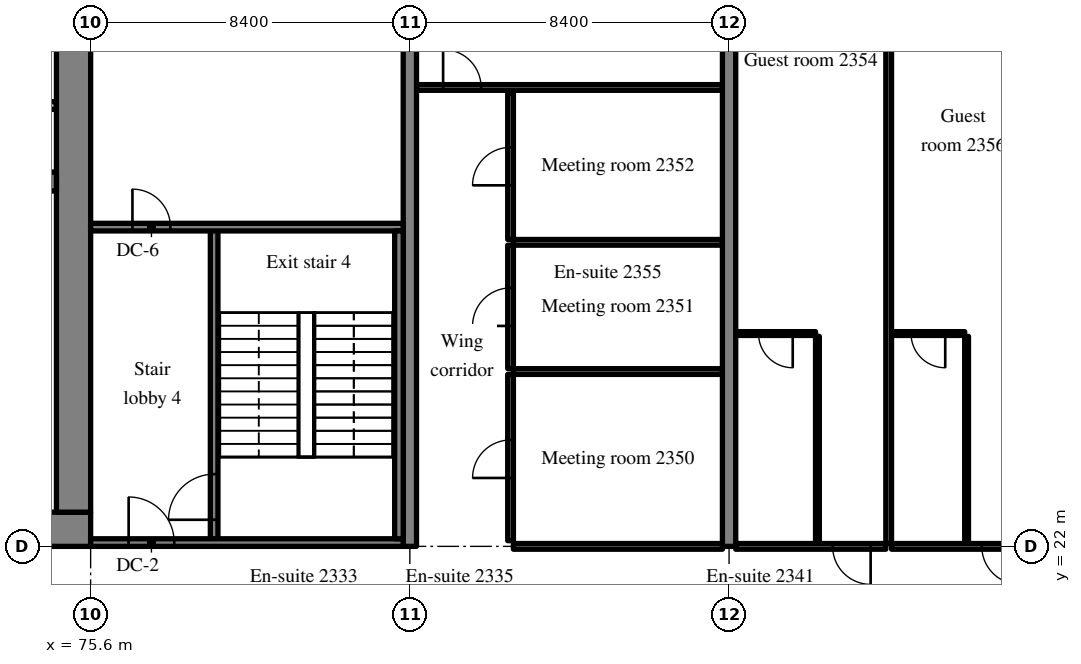
"""IFC4 building model, lengths in metres.
Left out: names, types, materials, properties, quantities, classifications, styles, units other than length and angle.
Written with IfcOpenShell. Run it as: python <this file> out.ifc"""

import sys

from ifc_helpers import new_model, si_unit, direction, frame, frame_2d, origin, place, context, subcontext, project, spatial, rectangle, extrude, source, transform, mapped, element, fill, save


model = new_model("IFC4")
c1 = context("Model", 3, precision=1e-05, world=origin(), true_north=direction((0.0, 1.0)))
c2 = subcontext(c1, "Body", "Model", "MODEL_VIEW")
j1 = project(units=[si_unit("LENGTHUNIT", "METRE"), si_unit("PLANEANGLEUNIT", "RADIAN")], contexts=[c1])
p1 = place(None, origin())
s1 = spatial("IfcSite", under=j1, at=p1, CompositionType="ELEMENT")
p2 = place(p1, origin())
s2 = spatial("IfcBuilding", under=s1, at=p2, CompositionType="ELEMENT")
p3 = place(p2, frame((0.0, 0.0, 99.0)))
s3 = spatial("IfcBuildingStorey", under=s2, at=p3, CompositionType="ELEMENT", Elevation=99.0)
m1 = source(origin(), c2, "Body", "SweptSolid", [
    extrude(rectangle(XDim=50.4, YDim=0.9, at=frame_2d((25.2, 0.0))), origin(), (0.0, 0.0, 1.0), 3.52),
])
p4 = place(p3, frame((25.2, 22.45, 0.0), z_axis=(0.0, 0.0, 1.0), x_axis=(1.0, 0.0, 0.0)))
e1 = element("IfcWall", 1, at=p4, inside=s3, PredefinedType="SHEAR", context=c2, shape_type="MappedRepresentation", body=[
    mapped(m1, transform((0.0, 0.0, 0.0), scale=1.0)),
])
m2 = source(origin(), c2, "Body", "SweptSolid", [
    extrude(rectangle(XDim=1.8, YDim=2.1, at=frame_2d((0.9, 1.05))), frame((0.0, 0.46, 0.0), z_axis=(0.0, -1.0, 0.0), x_axis=(1.0, 0.0, 0.0)), (0.0, 0.0, 1.0), 0.92),
])
p5 = place(p4, frame((15.9, 0.0, 0.0)))
e2 = element("IfcOpeningElement", 2, at=p5, cuts=e1, PredefinedType="OPENING", context=c2, shape_type="MappedRepresentation", body=[
    mapped(m2, transform((0.0, 0.0, 0.0), scale=1.0)),
])
m3 = source(origin(), c2, "Body", "SweptSolid", [
    extrude(rectangle(XDim=1.2, YDim=2.1, at=frame_2d((0.6, 1.05))), frame((0.0, 0.46, 0.0), z_axis=(0.0, -1.0, 0.0), x_axis=(1.0, 0.0, 0.0)), (0.0, 0.0, 1.0), 0.92),
])
p6 = place(p4, frame((26.975, 0.0, 0.0)))
e3 = element("IfcOpeningElement", 3, at=p6, cuts=e1, PredefinedType="OPENING", context=c2, shape_type="MappedRepresentation", body=[
    mapped(m3, transform((0.0, 0.0, 0.0), scale=1.0)),
])
m4 = source(origin(), c2, "Body", "SweptSolid", [
    extrude(rectangle(XDim=0.9, YDim=2.1, at=frame_2d((0.45, 1.05))), frame((0.0, 0.46, 0.0), z_axis=(0.0, -1.0, 0.0), x_axis=(1.0, 0.0, 0.0)), (0.0, 0.0, 1.0), 0.92),
])
p7 = place(p4, frame((32.25, 0.0, 0.0)))
e4 = element("IfcOpeningElement", 4, at=p7, cuts=e1, PredefinedType="OPENING", context=c2, shape_type="MappedRepresentation", body=[
    mapped(m4, transform((0.0, 0.0, 0.0), scale=1.0)),
])
p8 = place(p4, frame((38.275, 0.0, 0.0)))
e5 = element("IfcOpeningElement", 5, at=p8, cuts=e1, PredefinedType="OPENING", context=c2, shape_type="MappedRepresentation", body=[
    mapped(m4, transform((0.0, 0.0, 0.0), scale=1.0)),
])
p9 = place(p4, frame((6.45, 0.0, 0.0)))
e6 = element("IfcOpeningElement", 6, at=p9, cuts=e1, PredefinedType="OPENING", context=c2, shape_type="MappedRepresentation", body=[
    mapped(m3, transform((0.0, 0.0, 0.0), scale=1.0)),
])
p10 = place(p4, frame((47.775, 0.0, 0.0)))
e7 = element("IfcOpeningElement", 7, at=p10, cuts=e1, PredefinedType="OPENING", context=c2, shape_type="MappedRepresentation", body=[
    mapped(m3, transform((0.0, 0.0, 0.0), scale=1.0)),
])
m5 = source(origin(), c2, "Body", "SweptSolid", [
    extrude(rectangle(XDim=18.2, YDim=0.9, at=frame_2d((9.1, 0.0))), origin(), (0.0, 0.0, 1.0), 3.52),
])
p11 = place(p3, frame((75.15, 22.9, 0.0), z_axis=(0.0, 0.0, 1.0), x_axis=(0.0, 1.0, 0.0)))
e8 = element("IfcWall", 8, at=p11, inside=s3, PredefinedType="SHEAR", context=c2, shape_type="MappedRepresentation", body=[
    mapped(m5, transform((0.0, 0.0, 0.0), scale=1.0)),
])
p12 = place(p11, frame((12.5, 0.0, 0.0)))
e9 = element("IfcOpeningElement", 9, at=p12, cuts=e8, PredefinedType="OPENING", context=c2, shape_type="MappedRepresentation", body=[
    mapped(m3, transform((0.0, 0.0, 0.0), scale=1.0)),
])
m6 = source(origin(), c2, "Body", "SweptSolid", [
    extrude(rectangle(XDim=7.25, YDim=0.5, at=frame_2d((3.625, 0.0))), origin(), (0.0, 0.0, 1.0), 3.52),
])
p13 = place(p3, frame((67.45, 31.6, 0.0), z_axis=(0.0, 0.0, 1.0), x_axis=(1.0, 0.0, 0.0)))
e10 = element("IfcWall", 10, at=p13, inside=s3, PredefinedType="SHEAR", context=c2, shape_type="MappedRepresentation", body=[
    mapped(m6, transform((0.0, 0.0, 0.0), scale=1.0)),
])
m7 = source(origin(), c2, "Body", "SweptSolid", [
    extrude(rectangle(XDim=1.1, YDim=2.1, at=frame_2d((0.55, 1.05))), frame((0.0, 0.26, 0.0), z_axis=(0.0, -1.0, 0.0), x_axis=(1.0, 0.0, 0.0)), (0.0, 0.0, 1.0), 0.52),
])
p14 = place(p13, frame((5.575, 0.0, 0.0)))
e11 = element("IfcOpeningElement", 11, at=p14, cuts=e10, PredefinedType="OPENING", context=c2, shape_type="MappedRepresentation", body=[
    mapped(m7, transform((0.0, 0.0, 0.0), scale=1.0)),
])
m8 = source(origin(), c2, "Body", "SweptSolid", [
    extrude(rectangle(XDim=20.0, YDim=0.35, at=frame_2d((10.0, 0.0))), origin(), (0.0, 0.0, 1.0), 3.52),
])
for number, where, z_axis, x_axis in (
    (12, (84.0, 22.0, 0.0), (0.0, 0.0, 1.0), (0.0, 1.0, 0.0)),
    (13, (92.4, 22.0, 0.0), (0.0, 0.0, 1.0), (0.0, 1.0, 0.0)),
):
    element("IfcWall", number, at=place(p3, frame(where, z_axis=z_axis, x_axis=x_axis)), inside=s3, PredefinedType="SHEAR", context=c2, shape_type="MappedRepresentation", body=[
        mapped(m8, transform((0.0, 0.0, 0.0), scale=1.0)),
    ])
m9 = source(origin(), c2, "Body", "SweptSolid", [
    extrude(rectangle(XDim=2.25, YDim=0.2, at=frame_2d((1.125, 0.0))), origin(), (0.0, 0.0, 1.0), 3.52),
])
p15 = place(p3, frame((72.45, 33.6, 0.0), z_axis=(0.0, 0.0, 1.0), x_axis=(1.0, 0.0, 0.0)))
e14 = element("IfcWall", 14, at=p15, inside=s3, PredefinedType="SOLIDWALL", context=c2, shape_type="MappedRepresentation", body=[
    mapped(m9, transform((0.0, 0.0, 0.0), scale=1.0)),
])
m10 = source(origin(), c2, "Body", "SweptSolid", [
    extrude(rectangle(XDim=8.3, YDim=0.2, at=frame_2d((4.15, 0.0))), origin(), (0.0, 0.0, 1.0), 3.52),
])
p16 = place(p3, frame((78.85, 22.1, 0.0), z_axis=(0.0, 0.0, 1.0), x_axis=(0.0, 1.0, 0.0)))
e15 = element("IfcWall", 15, at=p16, inside=s3, PredefinedType="SOLIDWALL", context=c2, shape_type="MappedRepresentation", body=[
    mapped(m10, transform((0.0, 0.0, 0.0), scale=1.0)),
])
m11 = source(origin(), c2, "Body", "SweptSolid", [
    extrude(rectangle(XDim=1.2, YDim=2.1, at=frame_2d((0.6, 1.05))), frame((0.0, 0.11, 0.0), z_axis=(0.0, -1.0, 0.0), x_axis=(1.0, 0.0, 0.0)), (0.0, 0.0, 1.0), 0.22),
])
p17 = place(p16, frame((0.6, 0.0, 0.0)))
e16 = element("IfcOpeningElement", 16, at=p17, cuts=e15, PredefinedType="OPENING", context=c2, shape_type="MappedRepresentation", body=[
    mapped(m11, transform((0.0, 0.0, 0.0), scale=1.0)),
])
m12 = source(origin(), c2, "Body", "SweptSolid", [
    extrude(rectangle(XDim=8.225, YDim=0.2, at=frame_2d((4.112, 0.0))), origin(), (0.0, 0.0, 1.0), 3.52),
])
p18 = place(p3, frame((83.825, 22.1, 0.0), z_axis=(0.0, 0.0, 1.0), x_axis=(-1.0, 0.0, 0.0)))
e17 = element("IfcWall", 17, at=p18, inside=s3, PredefinedType="SOLIDWALL", context=c2, shape_type="MappedRepresentation", body=[
    mapped(m12, transform((0.0, 0.0, 0.0), scale=1.0)),
])
p19 = place(p18, frame((6.025, 0.0, 0.0)))
e18 = element("IfcOpeningElement", 18, at=p19, cuts=e17, PredefinedType="OPENING", context=c2, shape_type="MappedRepresentation", body=[
    mapped(m11, transform((0.0, 0.0, 0.0), scale=1.0)),
])
p20 = place(p3, frame((83.825, 30.4, 0.0), z_axis=(0.0, 0.0, 1.0), x_axis=(-1.0, 0.0, 0.0)))
e19 = element("IfcWall", 19, at=p20, inside=s3, PredefinedType="SOLIDWALL", context=c2, shape_type="MappedRepresentation", body=[
    mapped(m12, transform((0.0, 0.0, 0.0), scale=1.0)),
])
m13 = source(origin(), c2, "Body", "SweptSolid", [
    extrude(rectangle(XDim=1.0, YDim=2.1, at=frame_2d((0.5, 1.05))), frame((0.0, 0.11, 0.0), z_axis=(0.0, -1.0, 0.0), x_axis=(1.0, 0.0, 0.0)), (0.0, 0.0, 1.0), 0.22),
])
p21 = place(p20, frame((6.125, 0.0, 0.0)))
e20 = element("IfcOpeningElement", 20, at=p21, cuts=e19, PredefinedType="OPENING", context=c2, shape_type="MappedRepresentation", body=[
    mapped(m13, transform((0.0, 0.0, 0.0), scale=1.0)),
])
m14 = source(origin(), c2, "Body", "SweptSolid", [
    extrude(rectangle(XDim=8.1, YDim=0.225, at=frame_2d((4.05, 0.0))), origin(), (0.0, 0.0, 1.0), 3.52),
])
p22 = place(p3, frame((83.713, 22.2, 0.0), z_axis=(0.0, 0.0, 1.0), x_axis=(0.0, 1.0, 0.0)))
e21 = element("IfcWall", 21, at=p22, inside=s3, PredefinedType="SOLIDWALL", context=c2, shape_type="MappedRepresentation", body=[
    mapped(m14, transform((0.0, 0.0, 0.0), scale=1.0)),
])
m15 = source(origin(), c2, "Body", "SweptSolid", [
    extrude(rectangle(XDim=5.5, YDim=0.15, at=frame_2d((2.75, 0.0))), origin(), (0.0, 0.0, 1.0), 2.82),
])
p23 = place(p3, frame((86.725, 22.0, 0.0), z_axis=(0.0, 0.0, 1.0), x_axis=(1.0, 0.0, 0.0)))
e22 = element("IfcWall", 22, at=p23, inside=s3, PredefinedType="PARTITIONING", context=c2, shape_type="MappedRepresentation", body=[
    mapped(m15, transform((0.0, 0.0, 0.0), scale=1.0)),
])
m16 = source(origin(), c2, "Body", "SweptSolid", [
    extrude(rectangle(XDim=4.375, YDim=0.15, at=frame_2d((2.188, 0.0))), origin(), (0.0, 0.0, 1.0), 3.52),
])
p24 = place(p3, frame((86.65, 22.15, 0.0), z_axis=(0.0, 0.0, 1.0), x_axis=(0.0, 1.0, 0.0)))
e23 = element("IfcWall", 23, at=p24, inside=s3, PredefinedType="PARTITIONING", context=c2, shape_type="MappedRepresentation", body=[
    mapped(m16, transform((0.0, 0.0, 0.0), scale=1.0)),
])
m17 = source(origin(), c2, "Body", "SweptSolid", [
    extrude(rectangle(XDim=1.0, YDim=2.1, at=frame_2d((0.5, 1.05))), frame((0.0, 0.085, 0.0), z_axis=(0.0, -1.0, 0.0), x_axis=(1.0, 0.0, 0.0)), (0.0, 0.0, 1.0), 0.17),
])
p25 = place(p24, frame((1.65, 0.0, 0.0)))
e24 = element("IfcOpeningElement", 24, at=p25, cuts=e23, PredefinedType="OPENING", context=c2, shape_type="MappedRepresentation", body=[
    mapped(m17, transform((0.0, 0.0, 0.0), scale=1.0)),
])
m18 = source(origin(), c2, "Body", "SweptSolid", [
    extrude(rectangle(XDim=5.5, YDim=0.15, at=frame_2d((2.75, 0.0))), origin(), (0.0, 0.0, 1.0), 3.52),
])
p26 = place(p3, frame((86.725, 26.6, 0.0), z_axis=(0.0, 0.0, 1.0), x_axis=(1.0, 0.0, 0.0)))
e25 = element("IfcWall", 25, at=p26, inside=s3, PredefinedType="PARTITIONING", context=c2, shape_type="MappedRepresentation", body=[
    mapped(m18, transform((0.0, 0.0, 0.0), scale=1.0)),
])
m19 = source(origin(), c2, "Body", "SweptSolid", [
    extrude(rectangle(XDim=3.25, YDim=0.15, at=frame_2d((1.625, 0.0))), origin(), (0.0, 0.0, 1.0), 3.52),
])
p27 = place(p3, frame((86.65, 26.675, 0.0), z_axis=(0.0, 0.0, 1.0), x_axis=(0.0, 1.0, 0.0)))
e26 = element("IfcWall", 26, at=p27, inside=s3, PredefinedType="PARTITIONING", context=c2, shape_type="MappedRepresentation", body=[
    mapped(m19, transform((0.0, 0.0, 0.0), scale=1.0)),
])
p28 = place(p27, frame((1.125, 0.0, 0.0)))
e27 = element("IfcOpeningElement", 27, at=p28, cuts=e26, PredefinedType="OPENING", context=c2, shape_type="MappedRepresentation", body=[
    mapped(m17, transform((0.0, 0.0, 0.0), scale=1.0)),
])
p29 = place(p3, frame((86.725, 30.0, 0.0), z_axis=(0.0, 0.0, 1.0), x_axis=(1.0, 0.0, 0.0)))
e28 = element("IfcWall", 28, at=p29, inside=s3, PredefinedType="PARTITIONING", context=c2, shape_type="MappedRepresentation", body=[
    mapped(m18, transform((0.0, 0.0, 0.0), scale=1.0)),
])
m20 = source(origin(), c2, "Body", "SweptSolid", [
    extrude(rectangle(XDim=3.85, YDim=0.15, at=frame_2d((1.925, 0.0))), origin(), (0.0, 0.0, 1.0), 3.52),
])
p30 = place(p3, frame((86.65, 30.075, 0.0), z_axis=(0.0, 0.0, 1.0), x_axis=(0.0, 1.0, 0.0)))
e29 = element("IfcWall", 29, at=p30, inside=s3, PredefinedType="PARTITIONING", context=c2, shape_type="MappedRepresentation", body=[
    mapped(m20, transform((0.0, 0.0, 0.0), scale=1.0)),
])
p31 = place(p30, frame((1.425, 0.0, 0.0)))
e30 = element("IfcOpeningElement", 30, at=p31, cuts=e29, PredefinedType="OPENING", context=c2, shape_type="MappedRepresentation", body=[
    mapped(m17, transform((0.0, 0.0, 0.0), scale=1.0)),
])
m21 = source(origin(), c2, "Body", "SweptSolid", [
    extrude(rectangle(XDim=8.05, YDim=0.15, at=frame_2d((4.025, 0.0))), origin(), (0.0, 0.0, 1.0), 3.52),
])
p32 = place(p3, frame((84.175, 34.075, 0.0), z_axis=(0.0, 0.0, 1.0), x_axis=(1.0, 0.0, 0.0)))
e31 = element("IfcWall", 31, at=p32, inside=s3, PredefinedType="PARTITIONING", context=c2, shape_type="MappedRepresentation", body=[
    mapped(m21, transform((0.0, 0.0, 0.0), scale=1.0)),
])
p33 = place(p32, frame((0.7, 0.0, 0.0)))
e32 = element("IfcOpeningElement", 32, at=p33, cuts=e31, PredefinedType="OPENING", context=c2, shape_type="MappedRepresentation", body=[
    mapped(m17, transform((0.0, 0.0, 0.0), scale=1.0)),
])
m22 = source(origin(), c2, "Body", "SweptSolid", [
    extrude(rectangle(XDim=5.45, YDim=0.1, at=frame_2d((2.725, 0.0))), origin(), (0.0, 0.0, 1.0), 3.52),
])
p34 = place(p3, frame((94.725, 22.075, 0.0), z_axis=(0.0, 0.0, 1.0), x_axis=(0.0, 1.0, 0.0)))
e33 = element("IfcWall", 33, at=p34, inside=s3, PredefinedType="PARTITIONING", context=c2, shape_type="MappedRepresentation", body=[
    mapped(m22, transform((0.0, 0.0, 0.0), scale=1.0)),
])
m23 = source(origin(), c2, "Body", "SweptSolid", [
    extrude(rectangle(XDim=2.1, YDim=0.1, at=frame_2d((1.05, 0.0))), origin(), (0.0, 0.0, 1.0), 3.52),
])
p35 = place(p3, frame((92.575, 27.6, 0.0), z_axis=(0.0, 0.0, 1.0), x_axis=(1.0, 0.0, 0.0)))
e34 = element("IfcWall", 34, at=p35, inside=s3, PredefinedType="PARTITIONING", context=c2, shape_type="MappedRepresentation", body=[
    mapped(m23, transform((0.0, 0.0, 0.0), scale=1.0)),
])
m24 = source(origin(), c2, "Body", "SweptSolid", [
    extrude(rectangle(XDim=0.9, YDim=2.1, at=frame_2d((0.45, 1.05))), frame((0.0, 0.06, 0.0), z_axis=(0.0, -1.0, 0.0), x_axis=(1.0, 0.0, 0.0)), (0.0, 0.0, 1.0), 0.12),
])
p36 = place(p35, frame((0.6, 0.0, 0.0)))
e35 = element("IfcOpeningElement", 35, at=p36, cuts=e34, PredefinedType="OPENING", context=c2, shape_type="MappedRepresentation", body=[
    mapped(m24, transform((0.0, 0.0, 0.0), scale=1.0)),
])
m25 = source(origin(), c2, "Body", "SweptSolid", [
    extrude(rectangle(XDim=3.95, YDim=0.15, at=frame_2d((1.975, 0.0))), origin(), (0.0, 0.0, 1.0), 2.82),
])
p37 = place(p3, frame((92.575, 22.0, 0.0), z_axis=(0.0, 0.0, 1.0), x_axis=(1.0, 0.0, 0.0)))
e36 = element("IfcWall", 36, at=p37, inside=s3, PredefinedType="PARTITIONING", context=c2, shape_type="MappedRepresentation", body=[
    mapped(m25, transform((0.0, 0.0, 0.0), scale=1.0)),
])
p38 = place(p37, frame((2.55, 0.0, 0.0)))
e37 = element("IfcOpeningElement", 37, at=p38, cuts=e36, PredefinedType="OPENING", context=c2, shape_type="MappedRepresentation", body=[
    mapped(m17, transform((0.0, 0.0, 0.0), scale=1.0)),
])
p39 = place(p3, frame((98.65, 22.075, 0.0), z_axis=(0.0, 0.0, 1.0), x_axis=(0.0, 1.0, 0.0)))
e38 = element("IfcWall", 38, at=p39, inside=s3, PredefinedType="PARTITIONING", context=c2, shape_type="MappedRepresentation", body=[
    mapped(m22, transform((0.0, 0.0, 0.0), scale=1.0)),
])
m26 = source(origin(), c2, "Body", "SweptSolid", [
    extrude(rectangle(XDim=1.925, YDim=0.1, at=frame_2d((0.962, 0.0))), origin(), (0.0, 0.0, 1.0), 3.52),
])
p40 = place(p3, frame((96.675, 27.6, 0.0), z_axis=(0.0, 0.0, 1.0), x_axis=(1.0, 0.0, 0.0)))
e39 = element("IfcWall", 39, at=p40, inside=s3, PredefinedType="PARTITIONING", context=c2, shape_type="MappedRepresentation", body=[
    mapped(m26, transform((0.0, 0.0, 0.0), scale=1.0)),
])
p41 = place(p40, frame((0.513, 0.0, 0.0)))
e40 = element("IfcOpeningElement", 40, at=p41, cuts=e39, PredefinedType="OPENING", context=c2, shape_type="MappedRepresentation", body=[
    mapped(m24, transform((0.0, 0.0, 0.0), scale=1.0)),
])
m27 = source(origin(), c2, "Body", "SweptSolid", [
    extrude(rectangle(XDim=3.775, YDim=0.15, at=frame_2d((1.887, 0.0))), origin(), (0.0, 0.0, 1.0), 2.82),
])
p42 = place(p3, frame((96.675, 22.0, 0.0), z_axis=(0.0, 0.0, 1.0), x_axis=(1.0, 0.0, 0.0)))
e41 = element("IfcWall", 41, at=p42, inside=s3, PredefinedType="PARTITIONING", context=c2, shape_type="MappedRepresentation", body=[
    mapped(m27, transform((0.0, 0.0, 0.0), scale=1.0)),
])
p43 = place(p42, frame((2.375, 0.0, 0.0)))
e42 = element("IfcOpeningElement", 42, at=p43, cuts=e41, PredefinedType="OPENING", context=c2, shape_type="MappedRepresentation", body=[
    mapped(m17, transform((0.0, 0.0, 0.0), scale=1.0)),
])
m28 = source(origin(), c2, "Body", "SweptSolid", [
    extrude(rectangle(XDim=19.347, YDim=0.15, at=frame_2d((9.674, 0.0))), origin(), (0.0, 0.0, 1.0), 3.52),
])
p44 = place(p3, frame((96.6, 22.075, 0.0), z_axis=(0.0, 0.0, 1.0), x_axis=(0.0, 1.0, 0.0)))
e43 = element("IfcWall", 43, at=p44, inside=s3, PredefinedType="PARTITIONING", context=c2, shape_type="MappedRepresentation", body=[
    mapped(m28, transform((0.0, 0.0, 0.0), scale=1.0)),
])
m29 = source(origin(), c2, "Body", "SweptSolid", [
    extrude(rectangle(XDim=1.2, YDim=2.1, at=frame_2d((0.6, 1.05))), frame((0.0, 0.025, 0.0), z_axis=(0.0, -1.0, 0.0), x_axis=(1.0, 0.0, 0.0)), (0.0, 0.0, 1.0), 0.05),
])
p45 = place(p17, origin())
e44 = element("IfcDoor", 44, at=p45, inside=s3, OperationType="SINGLE_SWING_LEFT", PredefinedType="DOOR", context=c2, shape_type="MappedRepresentation", body=[
    mapped(m29, transform((0.0, 0.0, 0.0), scale=1.0)),
])
fill(e16, e44)
p46 = place(p19, origin())
e45 = element("IfcDoor", 45, at=p46, inside=s3, OperationType="SINGLE_SWING_RIGHT", PredefinedType="DOOR", context=c2, shape_type="MappedRepresentation", body=[
    mapped(m29, transform((0.0, 0.0, 0.0), scale=1.0)),
])
fill(e18, e45)
m30 = source(origin(), c2, "Body", "SweptSolid", [
    extrude(rectangle(XDim=1.0, YDim=2.1, at=frame_2d((0.5, 1.05))), frame((0.0, 0.025, 0.0), z_axis=(0.0, -1.0, 0.0), x_axis=(1.0, 0.0, 0.0)), (0.0, 0.0, 1.0), 0.05),
])
p47 = place(p21, origin())
e46 = element("IfcDoor", 46, at=p47, inside=s3, OperationType="SINGLE_SWING_RIGHT", PredefinedType="DOOR", context=c2, shape_type="MappedRepresentation", body=[
    mapped(m30, transform((0.0, 0.0, 0.0), scale=1.0)),
])
fill(e20, e46)
p48 = place(p25, origin())
e47 = element("IfcDoor", 47, at=p48, inside=s3, OperationType="SINGLE_SWING_LEFT", PredefinedType="DOOR", context=c2, shape_type="MappedRepresentation", body=[
    mapped(m30, transform((0.0, 0.0, 0.0), scale=1.0)),
])
fill(e24, e47)
p49 = place(p28, origin())
e48 = element("IfcDoor", 48, at=p49, inside=s3, OperationType="SINGLE_SWING_LEFT", PredefinedType="DOOR", context=c2, shape_type="MappedRepresentation", body=[
    mapped(m30, transform((0.0, 0.0, 0.0), scale=1.0)),
])
fill(e27, e48)
p50 = place(p31, origin())
e49 = element("IfcDoor", 49, at=p50, inside=s3, OperationType="SINGLE_SWING_LEFT", PredefinedType="DOOR", context=c2, shape_type="MappedRepresentation", body=[
    mapped(m30, transform((0.0, 0.0, 0.0), scale=1.0)),
])
fill(e30, e49)
p51 = place(p33, origin())
e50 = element("IfcDoor", 50, at=p51, inside=s3, OperationType="SINGLE_SWING_LEFT", PredefinedType="DOOR", context=c2, shape_type="MappedRepresentation", body=[
    mapped(m30, transform((0.0, 0.0, 0.0), scale=1.0)),
])
fill(e32, e50)
m31 = source(origin(), c2, "Body", "SweptSolid", [
    extrude(rectangle(XDim=0.9, YDim=2.1, at=frame_2d((0.45, 1.05))), frame((0.0, 0.025, 0.0), z_axis=(0.0, -1.0, 0.0), x_axis=(1.0, 0.0, 0.0)), (0.0, 0.0, 1.0), 0.05),
])
p52 = place(p36, origin())
e51 = element("IfcDoor", 51, at=p52, inside=s3, OperationType="SINGLE_SWING_RIGHT", PredefinedType="DOOR", context=c2, shape_type="MappedRepresentation", body=[
    mapped(m31, transform((0.0, 0.0, 0.0), scale=1.0)),
])
fill(e35, e51)
p53 = place(p38, origin())
e52 = element("IfcDoor", 52, at=p53, inside=s3, OperationType="SINGLE_SWING_RIGHT", PredefinedType="DOOR", context=c2, shape_type="MappedRepresentation", body=[
    mapped(m30, transform((0.0, 0.0, 0.0), scale=1.0)),
])
fill(e37, e52)
p54 = place(p41, origin())
e53 = element("IfcDoor", 53, at=p54, inside=s3, OperationType="SINGLE_SWING_RIGHT", PredefinedType="DOOR", context=c2, shape_type="MappedRepresentation", body=[
    mapped(m31, transform((0.0, 0.0, 0.0), scale=1.0)),
])
fill(e40, e53)
p55 = place(p43, origin())
e54 = element("IfcDoor", 54, at=p55, inside=s3, OperationType="SINGLE_SWING_RIGHT", PredefinedType="DOOR", context=c2, shape_type="MappedRepresentation", body=[
    mapped(m30, transform((0.0, 0.0, 0.0), scale=1.0)),
])
fill(e42, e54)
save(model, sys.argv[1])
